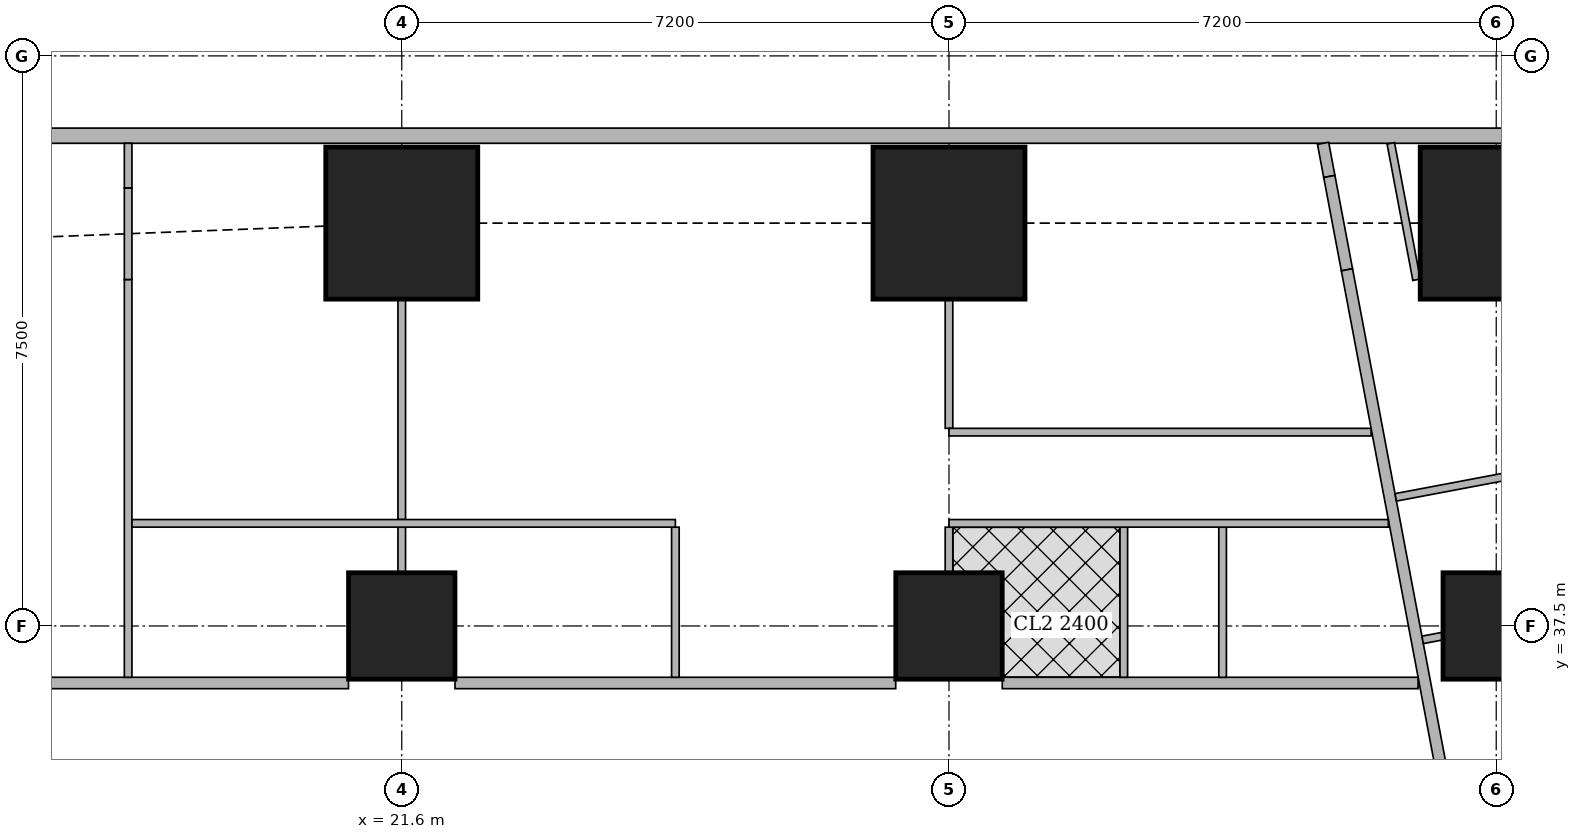
"""IFC4 building model, lengths in metres.
Left out: names, types, materials, properties, quantities, classifications, styles, units other than length and angle.
Written with IfcOpenShell. Run it as: python <this file> out.ifc"""

import sys

from ifc_helpers import new_model, si_unit, direction, frame, frame_2d, origin, origin_2d, place, context, subcontext, project, spatial, rectangle, extrude, element, fill, save


model = new_model("IFC4")
c1 = context("Model", 3, precision=1e-05, world=origin(), true_north=direction((0.0, 1.0)))
c2 = subcontext(c1, "Body", "Model", "MODEL_VIEW")
j1 = project(units=[si_unit("LENGTHUNIT", "METRE"), si_unit("PLANEANGLEUNIT", "RADIAN")], contexts=[c1])
p1 = place(None, origin())
s1 = spatial("IfcSite", under=j1, at=p1, CompositionType="ELEMENT")
p2 = place(p1, origin())
s2 = spatial("IfcBuilding", under=s1, at=p2, CompositionType="ELEMENT")
p3 = place(p2, frame((0.0, 0.0, 285.35)))
s3 = spatial("IfcBuildingStorey", under=s2, at=p3, CompositionType="ELEMENT", Elevation=285.35)
for number, where, z_axis, x_axis in (
    (1, (21.6, 37.5, 0.0), (0.0, 0.0, 1.0), (1.0, 0.0, 0.0)),
    (2, (28.8, 37.5, 0.0), (0.0, 0.0, 1.0), (1.0, 0.0, 0.0)),
    (3, (36.0, 37.5, 0.0), (0.0, 0.0, 1.0), (1.0, 0.0, 0.0)),
):
    element("IfcColumn", number, at=place(p3, frame(where, z_axis=z_axis, x_axis=x_axis)), inside=s3, PredefinedType="COLUMN", context=c2, shape_type="SweptSolid", body=[
        extrude(rectangle(XDim=1.4, YDim=1.4, at=origin_2d()), origin(), (0.0, 0.0, 1.0), 3.75),
    ])
for number, where, z_axis, x_axis in (
    (4, (21.6, 42.8, 0.0), (0.0, 0.0, 1.0), (1.0, 0.0, 0.0)),
    (5, (28.8, 42.8, 0.0), (0.0, 0.0, 1.0), (1.0, 0.0, 0.0)),
    (6, (36.0, 42.8, 0.0), (0.0, 0.0, 1.0), (1.0, 0.0, 0.0)),
):
    element("IfcColumn", number, at=place(p3, frame(where, z_axis=z_axis, x_axis=x_axis)), inside=s3, PredefinedType="COLUMN", context=c2, shape_type="SweptSolid", body=[
        extrude(rectangle(XDim=2.0, YDim=2.0, at=origin_2d()), origin(), (0.0, 0.0, 1.0), 3.75),
    ])
p4 = place(p3, frame((42.103, 43.95, 0.0), z_axis=(0.0, 0.0, 1.0), x_axis=(-1.0, 0.0, 0.0)))
e7 = element("IfcWall", 7, at=p4, inside=s3, PredefinedType="SOLIDWALL", context=c2, shape_type="SweptSolid", body=[
    extrude(rectangle(XDim=27.54, YDim=0.2, at=frame_2d((13.77, 0.0))), origin(), (0.0, 0.0, 1.0), 3.5),
])
p5 = place(p4, frame((10.603, 0.0, 0.9)))
e8 = element("IfcOpeningElement", 8, at=p5, cuts=e7, PredefinedType="OPENING", context=c2, shape_type="SweptSolid", body=[
    extrude(rectangle(XDim=1.8, YDim=1.5, at=frame_2d((0.9, 0.75))), frame((0.0, 0.11, 0.0), z_axis=(0.0, -1.0, 0.0), x_axis=(1.0, 0.0, 0.0)), (0.0, 0.0, 1.0), 0.22),
])
p6 = place(p4, frame((14.203, 0.0, 0.9)))
e9 = element("IfcOpeningElement", 9, at=p6, cuts=e7, PredefinedType="OPENING", context=c2, shape_type="SweptSolid", body=[
    extrude(rectangle(XDim=1.8, YDim=1.5, at=frame_2d((0.9, 0.75))), frame((0.0, 0.11, 0.0), z_axis=(0.0, -1.0, 0.0), x_axis=(1.0, 0.0, 0.0)), (0.0, 0.0, 1.0), 0.22),
])
p7 = place(p4, frame((17.803, 0.0, 0.9)))
e10 = element("IfcOpeningElement", 10, at=p7, cuts=e7, PredefinedType="OPENING", context=c2, shape_type="SweptSolid", body=[
    extrude(rectangle(XDim=1.8, YDim=1.5, at=frame_2d((0.9, 0.75))), frame((0.0, 0.11, 0.0), z_axis=(0.0, -1.0, 0.0), x_axis=(1.0, 0.0, 0.0)), (0.0, 0.0, 1.0), 0.22),
])
p8 = place(p4, frame((21.403, 0.0, 0.9)))
e11 = element("IfcOpeningElement", 11, at=p8, cuts=e7, PredefinedType="OPENING", context=c2, shape_type="SweptSolid", body=[
    extrude(rectangle(XDim=1.8, YDim=1.5, at=frame_2d((0.9, 0.75))), frame((0.0, 0.11, 0.0), z_axis=(0.0, -1.0, 0.0), x_axis=(1.0, 0.0, 0.0)), (0.0, 0.0, 1.0), 0.22),
])
p9 = place(p3, frame((16.001, 36.75, 0.0), z_axis=(0.0, 0.0, 1.0), x_axis=(1.0, 0.0, 0.0)))
e12 = element("IfcWall", 12, at=p9, inside=s3, PredefinedType="SOLIDWALL", context=c2, shape_type="SweptSolid", body=[
    extrude(rectangle(XDim=4.898, YDim=0.15, at=frame_2d((2.449, 0.0))), origin(), (0.0, 0.0, 1.0), 3.5),
])
p10 = place(p3, frame((22.301, 36.75, 0.0), z_axis=(0.0, 0.0, 1.0), x_axis=(1.0, 0.0, 0.0)))
e13 = element("IfcWall", 13, at=p10, inside=s3, PredefinedType="SOLIDWALL", context=c2, shape_type="SweptSolid", body=[
    extrude(rectangle(XDim=5.798, YDim=0.15, at=frame_2d((2.899, 0.0))), origin(), (0.0, 0.0, 1.0), 3.5),
])
p11 = place(p10, frame((4.199, 0.0, 0.0)))
e14 = element("IfcOpeningElement", 14, at=p11, cuts=e13, PredefinedType="OPENING", context=c2, shape_type="SweptSolid", body=[
    extrude(rectangle(XDim=1.0, YDim=2.1, at=frame_2d((0.5, 1.05))), frame((0.0, 0.085, 0.0), z_axis=(0.0, -1.0, 0.0), x_axis=(1.0, 0.0, 0.0)), (0.0, 0.0, 1.0), 0.17),
])
p12 = place(p3, frame((29.501, 36.75, 0.0), z_axis=(0.0, 0.0, 1.0), x_axis=(1.0, 0.0, 0.0)))
e15 = element("IfcWall", 15, at=p12, inside=s3, PredefinedType="SOLIDWALL", context=c2, shape_type="SweptSolid", body=[
    extrude(rectangle(XDim=5.471, YDim=0.15, at=frame_2d((2.735, 0.0))), origin(), (0.0, 0.0, 1.0), 3.5),
])
p13 = place(p3, frame((33.722, 43.85, 0.0), z_axis=(0.0, 0.0, 1.0), x_axis=(0.184886516626, -0.982759877066, 0.0)))
e16 = element("IfcWall", 16, at=p13, inside=s3, PredefinedType="SOLIDWALL", context=c2, shape_type="SweptSolid", body=[
    extrude(rectangle(XDim=0.444, YDim=0.15, at=frame_2d((0.222, 0.0))), origin(), (0.0, 0.0, 1.0), 3.5),
])
p14 = place(p3, frame((33.804, 43.414, 0.0), z_axis=(0.0, 0.0, 1.0), x_axis=(0.185585816539, -0.982628060204, 0.0)))
e17 = element("IfcWall", 17, at=p14, inside=s3, PredefinedType="SOLIDWALL", context=c2, shape_type="SweptSolid", body=[
    extrude(rectangle(XDim=1.25, YDim=0.15, at=frame_2d((0.625, 0.0))), origin(), (0.0, 0.0, 1.0), 2.05),
])
p15 = place(p3, frame((34.036, 42.186, 0.0), z_axis=(0.0, 0.0, 1.0), x_axis=(0.185593518645, -0.9826266055, 0.0)))
e18 = element("IfcWall", 18, at=p15, inside=s3, PredefinedType="SOLIDWALL", context=c2, shape_type="SweptSolid", body=[
    extrude(rectangle(XDim=35.961, YDim=0.15, at=frame_2d((17.98, 0.0))), origin(), (0.0, 0.0, 1.0), 2.5),
])
p16 = place(p15, frame((19.345, 0.0, 0.0)))
e19 = element("IfcOpeningElement", 19, at=p16, cuts=e18, PredefinedType="OPENING", context=c2, shape_type="SweptSolid", body=[
    extrude(rectangle(XDim=1.0, YDim=2.1, at=frame_2d((0.5, 1.05))), frame((0.0, 0.085, 0.0), z_axis=(0.0, -1.0, 0.0), x_axis=(1.0, 0.0, 0.0)), (0.0, 0.0, 1.0), 0.17),
])
p17 = place(p15, frame((33.774, 0.0, 0.0)))
e20 = element("IfcOpeningElement", 20, at=p17, cuts=e18, PredefinedType="OPENING", context=c2, shape_type="SweptSolid", body=[
    extrude(rectangle(XDim=1.0, YDim=2.1, at=frame_2d((0.5, 1.05))), frame((0.0, 0.085, 0.0), z_axis=(0.0, -1.0, 0.0), x_axis=(1.0, 0.0, 0.0)), (0.0, 0.0, 1.0), 0.17),
])
p18 = place(p3, frame((34.952, 42.055, 0.0), z_axis=(0.0, 0.0, 1.0), x_axis=(-0.185490642006, 0.98264603074, 0.0)))
e21 = element("IfcWall", 21, at=p18, inside=s3, PredefinedType="PARTITIONING", context=c2, shape_type="SweptSolid", body=[
    extrude(rectangle(XDim=1.827, YDim=0.1, at=frame_2d((0.914, 0.0))), origin(), (0.0, 0.0, 1.0), 2.05),
])
p19 = place(p3, frame((37.896, 39.8, 0.0), z_axis=(0.0, 0.0, 1.0), x_axis=(-0.982607026909, -0.185697147715, 0.0)))
e22 = element("IfcWall", 22, at=p19, inside=s3, PredefinedType="PARTITIONING", context=c2, shape_type="SweptSolid", body=[
    extrude(rectangle(XDim=3.275, YDim=0.1, at=frame_2d((1.637, 0.0))), origin(), (0.0, 0.0, 1.0), 3.5),
])
p20 = place(p3, frame((35.29, 37.366, 0.0), z_axis=(0.0, 0.0, 1.0), x_axis=(-0.982395465615, -0.18681313963, 0.0)))
e23 = element("IfcWall", 23, at=p20, inside=s3, PredefinedType="PARTITIONING", context=c2, shape_type="SweptSolid", body=[
    extrude(rectangle(XDim=0.263, YDim=0.1, at=frame_2d((0.131, 0.0))), origin(), (0.0, 0.0, 1.0), 3.5),
])
p21 = place(p3, frame((18.0, 36.825, 0.0), z_axis=(0.0, 0.0, 1.0), x_axis=(0.0, 1.0, 0.0)))
e24 = element("IfcWall", 24, at=p21, inside=s3, PredefinedType="PARTITIONING", context=c2, shape_type="SweptSolid", body=[
    extrude(rectangle(XDim=5.233, YDim=0.1, at=frame_2d((2.617, 0.0))), origin(), (0.0, 0.0, 1.0), 3.5),
])
p22 = place(p21, frame((2.175, 0.0, 0.0)))
e25 = element("IfcOpeningElement", 25, at=p22, cuts=e24, PredefinedType="OPENING", context=c2, shape_type="SweptSolid", body=[
    extrude(rectangle(XDim=0.9, YDim=2.1, at=frame_2d((0.45, 1.05))), frame((0.0, 0.06, 0.0), z_axis=(0.0, -1.0, 0.0), x_axis=(1.0, 0.0, 0.0)), (0.0, 0.0, 1.0), 0.12),
])
p23 = place(p3, frame((18.0, 42.058, 0.0), z_axis=(0.0, 0.0, 1.0), x_axis=(0.0, 1.0, 0.0)))
e26 = element("IfcWall", 26, at=p23, inside=s3, PredefinedType="PARTITIONING", context=c2, shape_type="SweptSolid", body=[
    extrude(rectangle(XDim=1.205, YDim=0.1, at=frame_2d((0.603, 0.0))), origin(), (0.0, 0.0, 1.0), 2.05),
])
p24 = place(p3, frame((18.0, 43.263, 0.0), z_axis=(0.0, 0.0, 1.0), x_axis=(0.0, 1.0, 0.0)))
e27 = element("IfcWall", 27, at=p24, inside=s3, PredefinedType="PARTITIONING", context=c2, shape_type="SweptSolid", body=[
    extrude(rectangle(XDim=0.587, YDim=0.1, at=frame_2d((0.293, 0.0))), origin(), (0.0, 0.0, 1.0), 3.5),
])
p25 = place(p3, frame((21.6, 38.9, 0.0), z_axis=(0.0, 0.0, 1.0), x_axis=(0.0, 1.0, 0.0)))
e28 = element("IfcWall", 28, at=p25, inside=s3, PredefinedType="PARTITIONING", context=c2, shape_type="SweptSolid", body=[
    extrude(rectangle(XDim=2.899, YDim=0.1, at=frame_2d((1.45, 0.0))), origin(), (0.0, 0.0, 1.0), 3.5),
])
p26 = place(p25, frame((0.15, 0.0, 0.0)))
e29 = element("IfcOpeningElement", 29, at=p26, cuts=e28, PredefinedType="OPENING", context=c2, shape_type="SweptSolid", body=[
    extrude(rectangle(XDim=0.9, YDim=2.1, at=frame_2d((0.45, 1.05))), frame((0.0, 0.06, 0.0), z_axis=(0.0, -1.0, 0.0), x_axis=(1.0, 0.0, 0.0)), (0.0, 0.0, 1.0), 0.12),
])
p27 = place(p3, frame((28.8, 40.1, 0.0), z_axis=(0.0, 0.0, 1.0), x_axis=(0.0, 1.0, 0.0)))
e30 = element("IfcWall", 30, at=p27, inside=s3, PredefinedType="PARTITIONING", context=c2, shape_type="SweptSolid", body=[
    extrude(rectangle(XDim=1.699, YDim=0.1, at=frame_2d((0.85, 0.0))), origin(), (0.0, 0.0, 1.0), 3.5),
])
p28 = place(p3, frame((21.6, 38.201, 0.0), z_axis=(0.0, 0.0, 1.0), x_axis=(0.0, 1.0, 0.0)))
e31 = element("IfcWall", 31, at=p28, inside=s3, PredefinedType="PARTITIONING", context=c2, shape_type="SweptSolid", body=[
    extrude(rectangle(XDim=0.599, YDim=0.1, at=frame_2d((0.3, 0.0))), origin(), (0.0, 0.0, 1.0), 3.5),
])
p29 = place(p3, frame((25.2, 36.825, 0.0), z_axis=(0.0, 0.0, 1.0), x_axis=(0.0, 1.0, 0.0)))
e32 = element("IfcWall", 32, at=p29, inside=s3, PredefinedType="PARTITIONING", context=c2, shape_type="SweptSolid", body=[
    extrude(rectangle(XDim=1.975, YDim=0.1, at=frame_2d((0.988, 0.0))), origin(), (0.0, 0.0, 1.0), 3.5),
])
p30 = place(p3, frame((28.8, 38.201, 0.0), z_axis=(0.0, 0.0, 1.0), x_axis=(0.0, 1.0, 0.0)))
e33 = element("IfcWall", 33, at=p30, inside=s3, PredefinedType="PARTITIONING", context=c2, shape_type="SweptSolid", body=[
    extrude(rectangle(XDim=0.599, YDim=0.1, at=frame_2d((0.3, 0.0))), origin(), (0.0, 0.0, 1.0), 3.5),
])
for number, where, z_axis, x_axis in (
    (34, (32.4, 36.825, 0.0), (0.0, 0.0, 1.0), (0.0, 1.0, 0.0)),
    (35, (31.1, 36.825, 0.0), (0.0, 0.0, 1.0), (0.0, 1.0, 0.0)),
):
    element("IfcWall", number, at=place(p3, frame(where, z_axis=z_axis, x_axis=x_axis)), inside=s3, PredefinedType="PARTITIONING", context=c2, shape_type="SweptSolid", body=[
        extrude(rectangle(XDim=1.975, YDim=0.1, at=frame_2d((0.988, 0.0))), origin(), (0.0, 0.0, 1.0), 3.5),
    ])
p31 = place(p3, frame((18.05, 38.85, 0.0), z_axis=(0.0, 0.0, 1.0), x_axis=(1.0, 0.0, 0.0)))
e36 = element("IfcWall", 36, at=p31, inside=s3, PredefinedType="PARTITIONING", context=c2, shape_type="SweptSolid", body=[
    extrude(rectangle(XDim=7.15, YDim=0.1, at=frame_2d((3.575, 0.0))), origin(), (0.0, 0.0, 1.0), 3.5),
])
p32 = place(p31, frame((1.3, 0.0, 0.0)))
e37 = element("IfcOpeningElement", 37, at=p32, cuts=e36, PredefinedType="OPENING", context=c2, shape_type="SweptSolid", body=[
    extrude(rectangle(XDim=0.9, YDim=2.1, at=frame_2d((0.45, 1.05))), frame((0.0, 0.06, 0.0), z_axis=(0.0, -1.0, 0.0), x_axis=(1.0, 0.0, 0.0)), (0.0, 0.0, 1.0), 0.12),
])
p33 = place(p31, frame((4.9, 0.0, 0.0)))
e38 = element("IfcOpeningElement", 38, at=p33, cuts=e36, PredefinedType="OPENING", context=c2, shape_type="SweptSolid", body=[
    extrude(rectangle(XDim=0.9, YDim=2.1, at=frame_2d((0.45, 1.05))), frame((0.0, 0.06, 0.0), z_axis=(0.0, -1.0, 0.0), x_axis=(1.0, 0.0, 0.0)), (0.0, 0.0, 1.0), 0.12),
])
p34 = place(p3, frame((28.8, 38.85, 0.0), z_axis=(0.0, 0.0, 1.0), x_axis=(1.0, 0.0, 0.0)))
e39 = element("IfcWall", 39, at=p34, inside=s3, PredefinedType="PARTITIONING", context=c2, shape_type="SweptSolid", body=[
    extrude(rectangle(XDim=5.781, YDim=0.1, at=frame_2d((2.891, 0.0))), origin(), (0.0, 0.0, 1.0), 3.5),
])
p35 = place(p34, frame((0.75, 0.0, 0.0)))
e40 = element("IfcOpeningElement", 40, at=p35, cuts=e39, PredefinedType="OPENING", context=c2, shape_type="SweptSolid", body=[
    extrude(rectangle(XDim=0.9, YDim=2.1, at=frame_2d((0.45, 1.05))), frame((0.0, 0.06, 0.0), z_axis=(0.0, -1.0, 0.0), x_axis=(1.0, 0.0, 0.0)), (0.0, 0.0, 1.0), 0.12),
])
p36 = place(p34, frame((2.5, 0.0, 0.0)))
e41 = element("IfcOpeningElement", 41, at=p36, cuts=e39, PredefinedType="OPENING", context=c2, shape_type="SweptSolid", body=[
    extrude(rectangle(XDim=0.9, YDim=2.1, at=frame_2d((0.45, 1.05))), frame((0.0, 0.06, 0.0), z_axis=(0.0, -1.0, 0.0), x_axis=(1.0, 0.0, 0.0)), (0.0, 0.0, 1.0), 0.12),
])
p37 = place(p34, frame((3.85, 0.0, 0.0)))
e42 = element("IfcOpeningElement", 42, at=p37, cuts=e39, PredefinedType="OPENING", context=c2, shape_type="SweptSolid", body=[
    extrude(rectangle(XDim=0.9, YDim=2.1, at=frame_2d((0.45, 1.05))), frame((0.0, 0.06, 0.0), z_axis=(0.0, -1.0, 0.0), x_axis=(1.0, 0.0, 0.0)), (0.0, 0.0, 1.0), 0.12),
])
p38 = place(p3, frame((28.8, 40.05, 0.0), z_axis=(0.0, 0.0, 1.0), x_axis=(1.0, 0.0, 0.0)))
e43 = element("IfcWall", 43, at=p38, inside=s3, PredefinedType="PARTITIONING", context=c2, shape_type="SweptSolid", body=[
    extrude(rectangle(XDim=5.554, YDim=0.1, at=frame_2d((2.777, 0.0))), origin(), (0.0, 0.0, 1.0), 3.5),
])
p39 = place(p38, frame((0.3, 0.0, 0.0)))
e44 = element("IfcOpeningElement", 44, at=p39, cuts=e43, PredefinedType="OPENING", context=c2, shape_type="SweptSolid", body=[
    extrude(rectangle(XDim=0.9, YDim=2.1, at=frame_2d((0.45, 1.05))), frame((0.0, 0.06, 0.0), z_axis=(0.0, -1.0, 0.0), x_axis=(1.0, 0.0, 0.0)), (0.0, 0.0, 1.0), 0.12),
])
p40 = place(p5, origin())
e45 = element("IfcWindow", 45, at=p40, inside=s3, PartitioningType="SINGLE_PANEL", PredefinedType="WINDOW", context=c2, shape_type="SweptSolid", body=[
    extrude(rectangle(XDim=1.8, YDim=1.5, at=frame_2d((0.9, 0.75))), frame((0.0, 0.03, 0.0), z_axis=(0.0, -1.0, 0.0), x_axis=(1.0, 0.0, 0.0)), (0.0, 0.0, 1.0), 0.06),
])
fill(e8, e45)
p41 = place(p6, origin())
e46 = element("IfcWindow", 46, at=p41, inside=s3, PartitioningType="SINGLE_PANEL", PredefinedType="WINDOW", context=c2, shape_type="SweptSolid", body=[
    extrude(rectangle(XDim=1.8, YDim=1.5, at=frame_2d((0.9, 0.75))), frame((0.0, 0.03, 0.0), z_axis=(0.0, -1.0, 0.0), x_axis=(1.0, 0.0, 0.0)), (0.0, 0.0, 1.0), 0.06),
])
fill(e9, e46)
p42 = place(p7, origin())
e47 = element("IfcWindow", 47, at=p42, inside=s3, PartitioningType="SINGLE_PANEL", PredefinedType="WINDOW", context=c2, shape_type="SweptSolid", body=[
    extrude(rectangle(XDim=1.8, YDim=1.5, at=frame_2d((0.9, 0.75))), frame((0.0, 0.03, 0.0), z_axis=(0.0, -1.0, 0.0), x_axis=(1.0, 0.0, 0.0)), (0.0, 0.0, 1.0), 0.06),
])
fill(e10, e47)
p43 = place(p8, origin())
e48 = element("IfcWindow", 48, at=p43, inside=s3, PartitioningType="SINGLE_PANEL", PredefinedType="WINDOW", context=c2, shape_type="SweptSolid", body=[
    extrude(rectangle(XDim=1.8, YDim=1.5, at=frame_2d((0.9, 0.75))), frame((0.0, 0.03, 0.0), z_axis=(0.0, -1.0, 0.0), x_axis=(1.0, 0.0, 0.0)), (0.0, 0.0, 1.0), 0.06),
])
fill(e11, e48)
p44 = place(p26, origin())
e49 = element("IfcDoor", 49, at=p44, inside=s3, OperationType="SINGLE_SWING_LEFT", PredefinedType="DOOR", context=c2, shape_type="SweptSolid", body=[
    extrude(rectangle(XDim=0.9, YDim=2.1, at=frame_2d((0.45, 1.05))), frame((0.0, 0.025, 0.0), z_axis=(0.0, -1.0, 0.0), x_axis=(1.0, 0.0, 0.0)), (0.0, 0.0, 1.0), 0.05),
])
fill(e29, e49)
p45 = place(p22, origin())
e50 = element("IfcDoor", 50, at=p45, inside=s3, OperationType="SINGLE_SWING_RIGHT", PredefinedType="DOOR", context=c2, shape_type="SweptSolid", body=[
    extrude(rectangle(XDim=0.9, YDim=2.1, at=frame_2d((0.45, 1.05))), frame((0.0, 0.025, 0.0), z_axis=(0.0, -1.0, 0.0), x_axis=(1.0, 0.0, 0.0)), (0.0, 0.0, 1.0), 0.05),
])
fill(e25, e50)
p46 = place(p32, origin())
e51 = element("IfcDoor", 51, at=p46, inside=s3, OperationType="SINGLE_SWING_RIGHT", PredefinedType="DOOR", context=c2, shape_type="SweptSolid", body=[
    extrude(rectangle(XDim=0.9, YDim=2.1, at=frame_2d((0.45, 1.05))), frame((0.0, 0.025, 0.0), z_axis=(0.0, -1.0, 0.0), x_axis=(1.0, 0.0, 0.0)), (0.0, 0.0, 1.0), 0.05),
])
fill(e37, e51)
p47 = place(p33, origin())
e52 = element("IfcDoor", 52, at=p47, inside=s3, OperationType="SINGLE_SWING_LEFT", PredefinedType="DOOR", context=c2, shape_type="SweptSolid", body=[
    extrude(rectangle(XDim=0.9, YDim=2.1, at=frame_2d((0.45, 1.05))), frame((0.0, 0.025, 0.0), z_axis=(0.0, -1.0, 0.0), x_axis=(1.0, 0.0, 0.0)), (0.0, 0.0, 1.0), 0.05),
])
fill(e38, e52)
p48 = place(p39, origin())
e53 = element("IfcDoor", 53, at=p48, inside=s3, OperationType="SINGLE_SWING_LEFT", PredefinedType="DOOR", context=c2, shape_type="SweptSolid", body=[
    extrude(rectangle(XDim=0.9, YDim=2.1, at=frame_2d((0.45, 1.05))), frame((0.0, 0.025, 0.0), z_axis=(0.0, -1.0, 0.0), x_axis=(1.0, 0.0, 0.0)), (0.0, 0.0, 1.0), 0.05),
])
fill(e44, e53)
p49 = place(p35, origin())
e54 = element("IfcDoor", 54, at=p49, inside=s3, OperationType="SINGLE_SWING_RIGHT", PredefinedType="DOOR", context=c2, shape_type="SweptSolid", body=[
    extrude(rectangle(XDim=0.9, YDim=2.1, at=frame_2d((0.45, 1.05))), frame((0.0, 0.025, 0.0), z_axis=(0.0, -1.0, 0.0), x_axis=(1.0, 0.0, 0.0)), (0.0, 0.0, 1.0), 0.05),
])
fill(e40, e54)
p50 = place(p36, origin())
e55 = element("IfcDoor", 55, at=p50, inside=s3, OperationType="SINGLE_SWING_LEFT", PredefinedType="DOOR", context=c2, shape_type="SweptSolid", body=[
    extrude(rectangle(XDim=0.9, YDim=2.1, at=frame_2d((0.45, 1.05))), frame((0.0, 0.025, 0.0), z_axis=(0.0, -1.0, 0.0), x_axis=(1.0, 0.0, 0.0)), (0.0, 0.0, 1.0), 0.05),
])
fill(e41, e55)
p51 = place(p37, origin())
e56 = element("IfcDoor", 56, at=p51, inside=s3, OperationType="SINGLE_SWING_RIGHT", PredefinedType="DOOR", context=c2, shape_type="SweptSolid", body=[
    extrude(rectangle(XDim=0.9, YDim=2.1, at=frame_2d((0.45, 1.05))), frame((0.0, 0.025, 0.0), z_axis=(0.0, -1.0, 0.0), x_axis=(1.0, 0.0, 0.0)), (0.0, 0.0, 1.0), 0.05),
])
fill(e42, e56)
p52 = place(p11, origin())
e57 = element("IfcDoor", 57, at=p52, inside=s3, OperationType="SINGLE_SWING_RIGHT", PredefinedType="DOOR", context=c2, shape_type="SweptSolid", body=[
    extrude(rectangle(XDim=1.0, YDim=2.1, at=frame_2d((0.5, 1.05))), frame((0.0, 0.025, 0.0), z_axis=(0.0, -1.0, 0.0), x_axis=(1.0, 0.0, 0.0)), (0.0, 0.0, 1.0), 0.05),
])
fill(e14, e57)
save(model, sys.argv[1])
